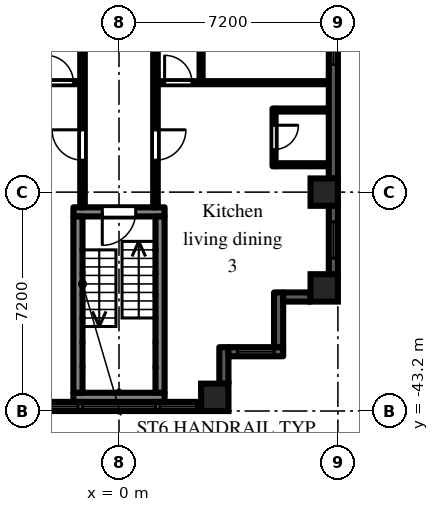
"""IFC4 building model, lengths in metres.
Left out: names, types, materials, properties, quantities, classifications, styles, units other than length and angle.
Written with IfcOpenShell. Run it as: python <this file> out.ifc"""

import sys

from ifc_helpers import new_model, si_unit, direction, frame, frame_2d, origin, origin_2d, place, context, subcontext, project, spatial, rectangle, extrude, element, fill, save


model = new_model("IFC4")
c1 = context("Model", 3, precision=1e-05, world=origin(), true_north=direction((0.0, 1.0)))
c2 = subcontext(c1, "Body", "Model", "MODEL_VIEW")
j1 = project(units=[si_unit("LENGTHUNIT", "METRE"), si_unit("PLANEANGLEUNIT", "RADIAN")], contexts=[c1])
p1 = place(None, origin())
s1 = spatial("IfcSite", under=j1, at=p1, CompositionType="ELEMENT")
p2 = place(p1, origin())
s2 = spatial("IfcBuilding", under=s1, at=p2, CompositionType="ELEMENT")
p3 = place(p2, frame((0.0, 0.0, 11.7)))
s3 = spatial("IfcBuildingStorey", under=s2, at=p3, CompositionType="ELEMENT", Elevation=11.7)
for number, where, z_axis, x_axis in (
    (1, (3.15, -42.75, 0.0), (0.0, 0.0, 1.0), (1.0, 0.0, 0.0)),
    (2, (6.75, -39.15, 0.0), (0.0, 0.0, 1.0), (1.0, 0.0, 0.0)),
    (3, (6.75, -36.0, 0.0), (0.0, 0.0, 1.0), (1.0, 0.0, 0.0)),
):
    element("IfcColumn", number, at=place(p3, frame(where, z_axis=z_axis, x_axis=x_axis)), inside=s3, PredefinedType="COLUMN", context=c2, shape_type="SweptSolid", body=[
        extrude(rectangle(XDim=0.9, YDim=0.9, at=origin_2d()), origin(), (0.0, 0.0, 1.0), 3.0),
    ])
p4 = place(p3, frame((-2.7, -43.05, 0.0), z_axis=(0.0, 0.0, 1.0), x_axis=(1.0, 0.0, 0.0)))
e4 = element("IfcWall", 4, at=p4, inside=s3, PredefinedType="SOLIDWALL", context=c2, shape_type="SweptSolid", body=[
    extrude(rectangle(XDim=5.4, YDim=0.3, at=frame_2d((2.7, 0.0))), origin(), (0.0, 0.0, 1.0), 2.1),
])
p5 = place(p4, frame((1.5, 0.0, 0.2)))
e5 = element("IfcOpeningElement", 5, at=p5, cuts=e4, PredefinedType="OPENING", context=c2, shape_type="SweptSolid", body=[
    extrude(rectangle(XDim=2.4, YDim=1.85, at=frame_2d((1.2, 0.925))), frame((0.0, 0.16, 0.0), z_axis=(0.0, -1.0, 0.0), x_axis=(1.0, 0.0, 0.0)), (0.0, 0.0, 1.0), 0.32),
])
p6 = place(p4, frame((0.15, 0.0, 0.2)))
e6 = element("IfcOpeningElement", 6, at=p6, cuts=e4, PredefinedType="OPENING", context=c2, shape_type="SweptSolid", body=[
    extrude(rectangle(XDim=1.2, YDim=1.85, at=frame_2d((0.6, 0.925))), frame((0.0, 0.16, 0.0), z_axis=(0.0, -1.0, 0.0), x_axis=(1.0, 0.0, 0.0)), (0.0, 0.0, 1.0), 0.32),
])
p7 = place(p4, frame((4.05, 0.0, 0.2)))
e7 = element("IfcOpeningElement", 7, at=p7, cuts=e4, PredefinedType="OPENING", context=c2, shape_type="SweptSolid", body=[
    extrude(rectangle(XDim=1.2, YDim=1.85, at=frame_2d((0.6, 0.925))), frame((0.0, 0.16, 0.0), z_axis=(0.0, -1.0, 0.0), x_axis=(1.0, 0.0, 0.0)), (0.0, 0.0, 1.0), 0.32),
])
p8 = place(p3, frame((3.45, -42.3, 0.0), z_axis=(0.0, 0.0, 1.0), x_axis=(0.0, 1.0, 0.0)))
e8 = element("IfcWall", 8, at=p8, inside=s3, PredefinedType="SOLIDWALL", context=c2, shape_type="SweptSolid", body=[
    extrude(rectangle(XDim=1.2, YDim=0.3, at=frame_2d((0.6, 0.0))), origin(), (0.0, 0.0, 1.0), 2.575),
])
p9 = place(p3, frame((3.6, -41.25, 0.0), z_axis=(0.0, 0.0, 1.0), x_axis=(1.0, 0.0, 0.0)))
e9 = element("IfcWall", 9, at=p9, inside=s3, PredefinedType="SOLIDWALL", context=c2, shape_type="SweptSolid", body=[
    extrude(rectangle(XDim=1.8, YDim=0.3, at=frame_2d((0.9, 0.0))), origin(), (0.0, 0.0, 1.0), 2.575),
])
p10 = place(p9, frame((0.3, 0.0, 0.2)))
e10 = element("IfcOpeningElement", 10, at=p10, cuts=e9, PredefinedType="OPENING", context=c2, shape_type="SweptSolid", body=[
    extrude(rectangle(XDim=1.2, YDim=1.85, at=frame_2d((0.6, 0.925))), frame((0.0, 0.16, 0.0), z_axis=(0.0, -1.0, 0.0), x_axis=(1.0, 0.0, 0.0)), (0.0, 0.0, 1.0), 0.32),
])
p11 = place(p3, frame((5.25, -41.1, 0.0), z_axis=(0.0, 0.0, 1.0), x_axis=(0.0, 1.0, 0.0)))
e11 = element("IfcWall", 11, at=p11, inside=s3, PredefinedType="SOLIDWALL", context=c2, shape_type="SweptSolid", body=[
    extrude(rectangle(XDim=1.8, YDim=0.3, at=frame_2d((0.9, 0.0))), origin(), (0.0, 0.0, 1.0), 2.575),
])
p12 = place(p3, frame((5.4, -39.45, 0.0), z_axis=(0.0, 0.0, 1.0), x_axis=(1.0, 0.0, 0.0)))
e12 = element("IfcWall", 12, at=p12, inside=s3, PredefinedType="SOLIDWALL", context=c2, shape_type="SweptSolid", body=[
    extrude(rectangle(XDim=0.9, YDim=0.3, at=frame_2d((0.45, 0.0))), origin(), (0.0, 0.0, 1.0), 2.575),
])
p13 = place(p3, frame((7.05, -38.7, 0.0), z_axis=(0.0, 0.0, 1.0), x_axis=(0.0, 1.0, 0.0)))
e13 = element("IfcWall", 13, at=p13, inside=s3, PredefinedType="SOLIDWALL", context=c2, shape_type="SweptSolid", body=[
    extrude(rectangle(XDim=2.25, YDim=0.3, at=frame_2d((1.125, 0.0))), origin(), (0.0, 0.0, 1.0), 2.1),
])
p14 = place(p13, frame((0.525, 0.0, 0.2)))
e14 = element("IfcOpeningElement", 14, at=p14, cuts=e13, PredefinedType="OPENING", context=c2, shape_type="SweptSolid", body=[
    extrude(rectangle(XDim=1.2, YDim=1.85, at=frame_2d((0.6, 0.925))), frame((0.0, 0.16, 0.0), z_axis=(0.0, -1.0, 0.0), x_axis=(1.0, 0.0, 0.0)), (0.0, 0.0, 1.0), 0.32),
])
p15 = place(p3, frame((7.05, -35.55, 0.0), z_axis=(0.0, 0.0, 1.0), x_axis=(0.0, 1.0, 0.0)))
e15 = element("IfcWall", 15, at=p15, inside=s3, PredefinedType="SOLIDWALL", context=c2, shape_type="SweptSolid", body=[
    extrude(rectangle(XDim=6.3, YDim=0.3, at=frame_2d((3.15, 0.0))), origin(), (0.0, 0.0, 1.0), 2.1),
])
p16 = place(p15, frame((3.75, 0.0, 0.2)))
e16 = element("IfcOpeningElement", 16, at=p16, cuts=e15, PredefinedType="OPENING", context=c2, shape_type="SweptSolid", body=[
    extrude(rectangle(XDim=2.4, YDim=1.85, at=frame_2d((1.2, 0.925))), frame((0.0, 0.16, 0.0), z_axis=(0.0, -1.0, 0.0), x_axis=(1.0, 0.0, 0.0)), (0.0, 0.0, 1.0), 0.32),
])
p17 = place(p3, frame((-1.5, -36.65, 0.0), z_axis=(0.0, 0.0, 1.0), x_axis=(1.0, 0.0, 0.0)))
e17 = element("IfcWall", 17, at=p17, inside=s3, PredefinedType="SHEAR", context=c2, shape_type="SweptSolid", body=[
    extrude(rectangle(XDim=3.0, YDim=0.3, at=frame_2d((1.5, 0.0))), origin(), (0.0, 0.0, 1.0), 2.575),
])
p18 = place(p17, frame((0.95, 0.0, 0.0)))
e18 = element("IfcOpeningElement", 18, at=p18, cuts=e17, PredefinedType="OPENING", context=c2, shape_type="SweptSolid", body=[
    extrude(rectangle(XDim=1.1, YDim=2.1, at=frame_2d((0.55, 1.05))), frame((0.0, 0.16, 0.0), z_axis=(0.0, -1.0, 0.0), x_axis=(1.0, 0.0, 0.0)), (0.0, 0.0, 1.0), 0.32),
])
p19 = place(p3, frame((-1.5, -42.75, 0.0), z_axis=(0.0, 0.0, 1.0), x_axis=(1.0, 0.0, 0.0)))
e19 = element("IfcWall", 19, at=p19, inside=s3, PredefinedType="SHEAR", context=c2, shape_type="SweptSolid", body=[
    extrude(rectangle(XDim=3.0, YDim=0.3, at=frame_2d((1.5, 0.0))), origin(), (0.0, 0.0, 1.0), 2.575),
])
for number, where, z_axis, x_axis in (
    (20, (-1.35, -36.8, 0.0), (0.0, 0.0, 1.0), (0.0, -1.0, 0.0)),
    (21, (1.35, -36.8, 0.0), (0.0, 0.0, 1.0), (0.0, -1.0, 0.0)),
):
    element("IfcWall", number, at=place(p3, frame(where, z_axis=z_axis, x_axis=x_axis)), inside=s3, PredefinedType="SHEAR", context=c2, shape_type="SweptSolid", body=[
        extrude(rectangle(XDim=5.8, YDim=0.3, at=frame_2d((2.9, 0.0))), origin(), (0.0, 0.0, 1.0), 2.575),
    ])
p20 = place(p3, frame((-6.9, -32.4, 0.0), z_axis=(0.0, 0.0, 1.0), x_axis=(1.0, 0.0, 0.0)))
e22 = element("IfcWall", 22, at=p20, inside=s3, PredefinedType="PARTITIONING", context=c2, shape_type="SweptSolid", body=[
    extrude(rectangle(XDim=5.625, YDim=0.1, at=frame_2d((2.812, 0.0))), origin(), (0.0, 0.0, 1.0), 2.575),
])
p21 = place(p20, frame((4.5, 0.0, 0.0)))
e23 = element("IfcOpeningElement", 23, at=p21, cuts=e22, PredefinedType="OPENING", context=c2, shape_type="SweptSolid", body=[
    extrude(rectangle(XDim=0.9, YDim=2.1, at=frame_2d((0.45, 1.05))), frame((0.0, 0.06, 0.0), z_axis=(0.0, -1.0, 0.0), x_axis=(1.0, 0.0, 0.0)), (0.0, 0.0, 1.0), 0.12),
])
p22 = place(p3, frame((-1.2, -36.5, 0.0), z_axis=(0.0, 0.0, 1.0), x_axis=(0.0, 1.0, 0.0)))
e24 = element("IfcWall", 24, at=p22, inside=s3, PredefinedType="PARTITIONING", context=c2, shape_type="SweptSolid", body=[
    extrude(rectangle(XDim=35.375, YDim=0.15, at=frame_2d((17.688, 0.0))), origin(), (0.0, 0.0, 1.0), 2.575),
])
p23 = place(p22, frame((31.85, 0.0, 0.0)))
e25 = element("IfcOpeningElement", 25, at=p23, cuts=e24, PredefinedType="OPENING", context=c2, shape_type="SweptSolid", body=[
    extrude(rectangle(XDim=0.9, YDim=2.1, at=frame_2d((0.45, 1.05))), frame((0.0, 0.085, 0.0), z_axis=(0.0, -1.0, 0.0), x_axis=(1.0, 0.0, 0.0)), (0.0, 0.0, 1.0), 0.17),
])
p24 = place(p22, frame((27.05, 0.0, 0.0)))
e26 = element("IfcOpeningElement", 26, at=p24, cuts=e24, PredefinedType="OPENING", context=c2, shape_type="SweptSolid", body=[
    extrude(rectangle(XDim=0.9, YDim=2.1, at=frame_2d((0.45, 1.05))), frame((0.0, 0.085, 0.0), z_axis=(0.0, -1.0, 0.0), x_axis=(1.0, 0.0, 0.0)), (0.0, 0.0, 1.0), 0.17),
])
p25 = place(p22, frame((1.55, 0.0, 0.0)))
e27 = element("IfcOpeningElement", 27, at=p25, cuts=e24, PredefinedType="OPENING", context=c2, shape_type="SweptSolid", body=[
    extrude(rectangle(XDim=1.0, YDim=2.1, at=frame_2d((0.5, 1.05))), frame((0.0, 0.085, 0.0), z_axis=(0.0, -1.0, 0.0), x_axis=(1.0, 0.0, 0.0)), (0.0, 0.0, 1.0), 0.17),
])
p26 = place(p3, frame((1.2, -36.5, 0.0), z_axis=(0.0, 0.0, 1.0), x_axis=(0.0, 1.0, 0.0)))
e28 = element("IfcWall", 28, at=p26, inside=s3, PredefinedType="PARTITIONING", context=c2, shape_type="SweptSolid", body=[
    extrude(rectangle(XDim=35.375, YDim=0.15, at=frame_2d((17.688, 0.0))), origin(), (0.0, 0.0, 1.0), 2.575),
])
p27 = place(p26, frame((33.65, 0.0, 0.0)))
e29 = element("IfcOpeningElement", 29, at=p27, cuts=e28, PredefinedType="OPENING", context=c2, shape_type="SweptSolid", body=[
    extrude(rectangle(XDim=0.9, YDim=2.1, at=frame_2d((0.45, 1.05))), frame((0.0, 0.085, 0.0), z_axis=(0.0, -1.0, 0.0), x_axis=(1.0, 0.0, 0.0)), (0.0, 0.0, 1.0), 0.17),
])
p28 = place(p26, frame((30.65, 0.0, 0.0)))
e30 = element("IfcOpeningElement", 30, at=p28, cuts=e28, PredefinedType="OPENING", context=c2, shape_type="SweptSolid", body=[
    extrude(rectangle(XDim=0.9, YDim=2.1, at=frame_2d((0.45, 1.05))), frame((0.0, 0.085, 0.0), z_axis=(0.0, -1.0, 0.0), x_axis=(1.0, 0.0, 0.0)), (0.0, 0.0, 1.0), 0.17),
])
p29 = place(p26, frame((27.45, 0.0, 0.0)))
e31 = element("IfcOpeningElement", 31, at=p29, cuts=e28, PredefinedType="OPENING", context=c2, shape_type="SweptSolid", body=[
    extrude(rectangle(XDim=0.9, YDim=2.1, at=frame_2d((0.45, 1.05))), frame((0.0, 0.085, 0.0), z_axis=(0.0, -1.0, 0.0), x_axis=(1.0, 0.0, 0.0)), (0.0, 0.0, 1.0), 0.17),
])
p30 = place(p26, frame((23.85, 0.0, 0.0)))
e32 = element("IfcOpeningElement", 32, at=p30, cuts=e28, PredefinedType="OPENING", context=c2, shape_type="SweptSolid", body=[
    extrude(rectangle(XDim=0.9, YDim=2.1, at=frame_2d((0.45, 1.05))), frame((0.0, 0.085, 0.0), z_axis=(0.0, -1.0, 0.0), x_axis=(1.0, 0.0, 0.0)), (0.0, 0.0, 1.0), 0.17),
])
p31 = place(p26, frame((19.85, 0.0, 0.0)))
e33 = element("IfcOpeningElement", 33, at=p31, cuts=e28, PredefinedType="OPENING", context=c2, shape_type="SweptSolid", body=[
    extrude(rectangle(XDim=0.9, YDim=2.1, at=frame_2d((0.45, 1.05))), frame((0.0, 0.085, 0.0), z_axis=(0.0, -1.0, 0.0), x_axis=(1.0, 0.0, 0.0)), (0.0, 0.0, 1.0), 0.17),
])
p32 = place(p26, frame((1.55, 0.0, 0.0)))
e34 = element("IfcOpeningElement", 34, at=p32, cuts=e28, PredefinedType="OPENING", context=c2, shape_type="SweptSolid", body=[
    extrude(rectangle(XDim=1.0, YDim=2.1, at=frame_2d((0.5, 1.05))), frame((0.0, 0.085, 0.0), z_axis=(0.0, -1.0, 0.0), x_axis=(1.0, 0.0, 0.0)), (0.0, 0.0, 1.0), 0.17),
])
p33 = place(p3, frame((1.275, -32.4, 0.0), z_axis=(0.0, 0.0, 1.0), x_axis=(1.0, 0.0, 0.0)))
e35 = element("IfcWall", 35, at=p33, inside=s3, PredefinedType="PARTITIONING", context=c2, shape_type="SweptSolid", body=[
    extrude(rectangle(XDim=5.625, YDim=0.1, at=frame_2d((2.812, 0.0))), origin(), (0.0, 0.0, 1.0), 2.575),
])
p34 = place(p33, frame((0.225, 0.0, 0.0)))
e36 = element("IfcOpeningElement", 36, at=p34, cuts=e35, PredefinedType="OPENING", context=c2, shape_type="SweptSolid", body=[
    extrude(rectangle(XDim=0.9, YDim=2.1, at=frame_2d((0.45, 1.05))), frame((0.0, 0.06, 0.0), z_axis=(0.0, -1.0, 0.0), x_axis=(1.0, 0.0, 0.0)), (0.0, 0.0, 1.0), 0.12),
])
p35 = place(p3, frame((2.7, -32.35, 0.0), z_axis=(0.0, 0.0, 1.0), x_axis=(0.0, 1.0, 0.0)))
e37 = element("IfcWall", 37, at=p35, inside=s3, PredefinedType="PARTITIONING", context=c2, shape_type="SweptSolid", body=[
    extrude(rectangle(XDim=14.3, YDim=0.1, at=frame_2d((7.15, 0.0))), origin(), (0.0, 0.0, 1.0), 2.575),
])
p36 = place(p35, frame((1.12, 0.0, 0.0)))
e38 = element("IfcOpeningElement", 38, at=p36, cuts=e37, PredefinedType="OPENING", context=c2, shape_type="SweptSolid", body=[
    extrude(rectangle(XDim=0.9, YDim=2.1, at=frame_2d((0.45, 1.05))), frame((0.0, 0.06, 0.0), z_axis=(0.0, -1.0, 0.0), x_axis=(1.0, 0.0, 0.0)), (0.0, 0.0, 1.0), 0.12),
])
p37 = place(p35, frame((12.28, 0.0, 0.0)))
e39 = element("IfcOpeningElement", 39, at=p37, cuts=e37, PredefinedType="OPENING", context=c2, shape_type="SweptSolid", body=[
    extrude(rectangle(XDim=0.9, YDim=2.1, at=frame_2d((0.45, 1.05))), frame((0.0, 0.06, 0.0), z_axis=(0.0, -1.0, 0.0), x_axis=(1.0, 0.0, 0.0)), (0.0, 0.0, 1.0), 0.12),
])
p38 = place(p3, frame((5.1, -35.15, 0.0), z_axis=(0.0, 0.0, 1.0), x_axis=(0.0, 1.0, 0.0)))
e40 = element("IfcWall", 40, at=p38, inside=s3, PredefinedType="PARTITIONING", context=c2, shape_type="SweptSolid", body=[
    extrude(rectangle(XDim=1.9, YDim=0.1, at=frame_2d((0.95, 0.0))), origin(), (0.0, 0.0, 1.0), 2.575),
])
p39 = place(p38, frame((0.55, 0.0, 0.0)))
e41 = element("IfcOpeningElement", 41, at=p39, cuts=e40, PredefinedType="OPENING", context=c2, shape_type="SweptSolid", body=[
    extrude(rectangle(XDim=0.8, YDim=2.1, at=frame_2d((0.4, 1.05))), frame((0.0, 0.06, 0.0), z_axis=(0.0, -1.0, 0.0), x_axis=(1.0, 0.0, 0.0)), (0.0, 0.0, 1.0), 0.12),
])
for number, where, z_axis, x_axis in (
    (42, (5.15, -35.1, 0.0), (0.0, 0.0, 1.0), (1.0, 0.0, 0.0)),
    (43, (5.15, -33.3, 0.0), (0.0, 0.0, 1.0), (1.0, 0.0, 0.0)),
):
    element("IfcWall", number, at=place(p3, frame(where, z_axis=z_axis, x_axis=x_axis)), inside=s3, PredefinedType="PARTITIONING", context=c2, shape_type="SweptSolid", body=[
        extrude(rectangle(XDim=1.75, YDim=0.1, at=frame_2d((0.875, 0.0))), origin(), (0.0, 0.0, 1.0), 2.575),
    ])
p40 = place(p5, origin())
e44 = element("IfcWindow", 44, at=p40, inside=s3, PartitioningType="SINGLE_PANEL", PredefinedType="WINDOW", context=c2, shape_type="SweptSolid", body=[
    extrude(rectangle(XDim=2.4, YDim=1.85, at=frame_2d((1.2, 0.925))), frame((0.0, 0.03, 0.0), z_axis=(0.0, -1.0, 0.0), x_axis=(1.0, 0.0, 0.0)), (0.0, 0.0, 1.0), 0.06),
])
fill(e5, e44)
p41 = place(p6, origin())
e45 = element("IfcWindow", 45, at=p41, inside=s3, PartitioningType="SINGLE_PANEL", PredefinedType="WINDOW", context=c2, shape_type="SweptSolid", body=[
    extrude(rectangle(XDim=1.2, YDim=1.85, at=frame_2d((0.6, 0.925))), frame((0.0, 0.03, 0.0), z_axis=(0.0, -1.0, 0.0), x_axis=(1.0, 0.0, 0.0)), (0.0, 0.0, 1.0), 0.06),
])
fill(e6, e45)
p42 = place(p7, origin())
e46 = element("IfcWindow", 46, at=p42, inside=s3, PartitioningType="SINGLE_PANEL", PredefinedType="WINDOW", context=c2, shape_type="SweptSolid", body=[
    extrude(rectangle(XDim=1.2, YDim=1.85, at=frame_2d((0.6, 0.925))), frame((0.0, 0.03, 0.0), z_axis=(0.0, -1.0, 0.0), x_axis=(1.0, 0.0, 0.0)), (0.0, 0.0, 1.0), 0.06),
])
fill(e7, e46)
p43 = place(p10, origin())
e47 = element("IfcWindow", 47, at=p43, inside=s3, PartitioningType="SINGLE_PANEL", PredefinedType="WINDOW", context=c2, shape_type="SweptSolid", body=[
    extrude(rectangle(XDim=1.2, YDim=1.85, at=frame_2d((0.6, 0.925))), frame((0.0, 0.03, 0.0), z_axis=(0.0, -1.0, 0.0), x_axis=(1.0, 0.0, 0.0)), (0.0, 0.0, 1.0), 0.06),
])
fill(e10, e47)
p44 = place(p14, origin())
e48 = element("IfcWindow", 48, at=p44, inside=s3, PartitioningType="SINGLE_PANEL", PredefinedType="WINDOW", context=c2, shape_type="SweptSolid", body=[
    extrude(rectangle(XDim=1.2, YDim=1.85, at=frame_2d((0.6, 0.925))), frame((0.0, 0.03, 0.0), z_axis=(0.0, -1.0, 0.0), x_axis=(1.0, 0.0, 0.0)), (0.0, 0.0, 1.0), 0.06),
])
fill(e14, e48)
p45 = place(p16, origin())
e49 = element("IfcWindow", 49, at=p45, inside=s3, PartitioningType="SINGLE_PANEL", PredefinedType="WINDOW", context=c2, shape_type="SweptSolid", body=[
    extrude(rectangle(XDim=2.4, YDim=1.85, at=frame_2d((1.2, 0.925))), frame((0.0, 0.03, 0.0), z_axis=(0.0, -1.0, 0.0), x_axis=(1.0, 0.0, 0.0)), (0.0, 0.0, 1.0), 0.06),
])
fill(e16, e49)
p46 = place(p18, frame((1.1, 0.0, 0.0), z_axis=(0.0, 0.0, 1.0), x_axis=(-1.0, 0.0, 0.0)))
e50 = element("IfcDoor", 50, at=p46, inside=s3, OperationType="SINGLE_SWING_RIGHT", PredefinedType="DOOR", context=c2, shape_type="SweptSolid", body=[
    extrude(rectangle(XDim=1.1, YDim=2.1, at=frame_2d((0.55, 1.05))), frame((0.0, 0.025, 0.0), z_axis=(0.0, -1.0, 0.0), x_axis=(1.0, 0.0, 0.0)), (0.0, 0.0, 1.0), 0.05),
])
fill(e18, e50)
p47 = place(p39, frame((0.8, 0.0, 0.0), z_axis=(0.0, 0.0, 1.0), x_axis=(-1.0, 0.0, 0.0)))
e51 = element("IfcDoor", 51, at=p47, inside=s3, OperationType="SINGLE_SWING_LEFT", PredefinedType="DOOR", context=c2, shape_type="SweptSolid", body=[
    extrude(rectangle(XDim=0.8, YDim=2.1, at=frame_2d((0.4, 1.05))), frame((0.0, 0.025, 0.0), z_axis=(0.0, -1.0, 0.0), x_axis=(1.0, 0.0, 0.0)), (0.0, 0.0, 1.0), 0.05),
])
fill(e41, e51)
p48 = place(p32, frame((1.0, 0.0, 0.0), z_axis=(0.0, 0.0, 1.0), x_axis=(-1.0, 0.0, 0.0)))
e52 = element("IfcDoor", 52, at=p48, inside=s3, OperationType="SINGLE_SWING_LEFT", PredefinedType="DOOR", context=c2, shape_type="SweptSolid", body=[
    extrude(rectangle(XDim=1.0, YDim=2.1, at=frame_2d((0.5, 1.05))), frame((0.0, 0.025, 0.0), z_axis=(0.0, -1.0, 0.0), x_axis=(1.0, 0.0, 0.0)), (0.0, 0.0, 1.0), 0.05),
])
fill(e34, e52)
p49 = place(p34, origin())
e53 = element("IfcDoor", 53, at=p49, inside=s3, OperationType="SINGLE_SWING_LEFT", PredefinedType="DOOR", context=c2, shape_type="SweptSolid", body=[
    extrude(rectangle(XDim=0.9, YDim=2.1, at=frame_2d((0.45, 1.05))), frame((0.0, 0.025, 0.0), z_axis=(0.0, -1.0, 0.0), x_axis=(1.0, 0.0, 0.0)), (0.0, 0.0, 1.0), 0.05),
])
fill(e36, e53)
p50 = place(p25, origin())
e54 = element("IfcDoor", 54, at=p50, inside=s3, OperationType="SINGLE_SWING_RIGHT", PredefinedType="DOOR", context=c2, shape_type="SweptSolid", body=[
    extrude(rectangle(XDim=1.0, YDim=2.1, at=frame_2d((0.5, 1.05))), frame((0.0, 0.025, 0.0), z_axis=(0.0, -1.0, 0.0), x_axis=(1.0, 0.0, 0.0)), (0.0, 0.0, 1.0), 0.05),
])
fill(e27, e54)
p51 = place(p21, origin())
e55 = element("IfcDoor", 55, at=p51, inside=s3, OperationType="SINGLE_SWING_LEFT", PredefinedType="DOOR", context=c2, shape_type="SweptSolid", body=[
    extrude(rectangle(XDim=0.9, YDim=2.1, at=frame_2d((0.45, 1.05))), frame((0.0, 0.025, 0.0), z_axis=(0.0, -1.0, 0.0), x_axis=(1.0, 0.0, 0.0)), (0.0, 0.0, 1.0), 0.05),
])
fill(e23, e55)
save(model, sys.argv[1])
